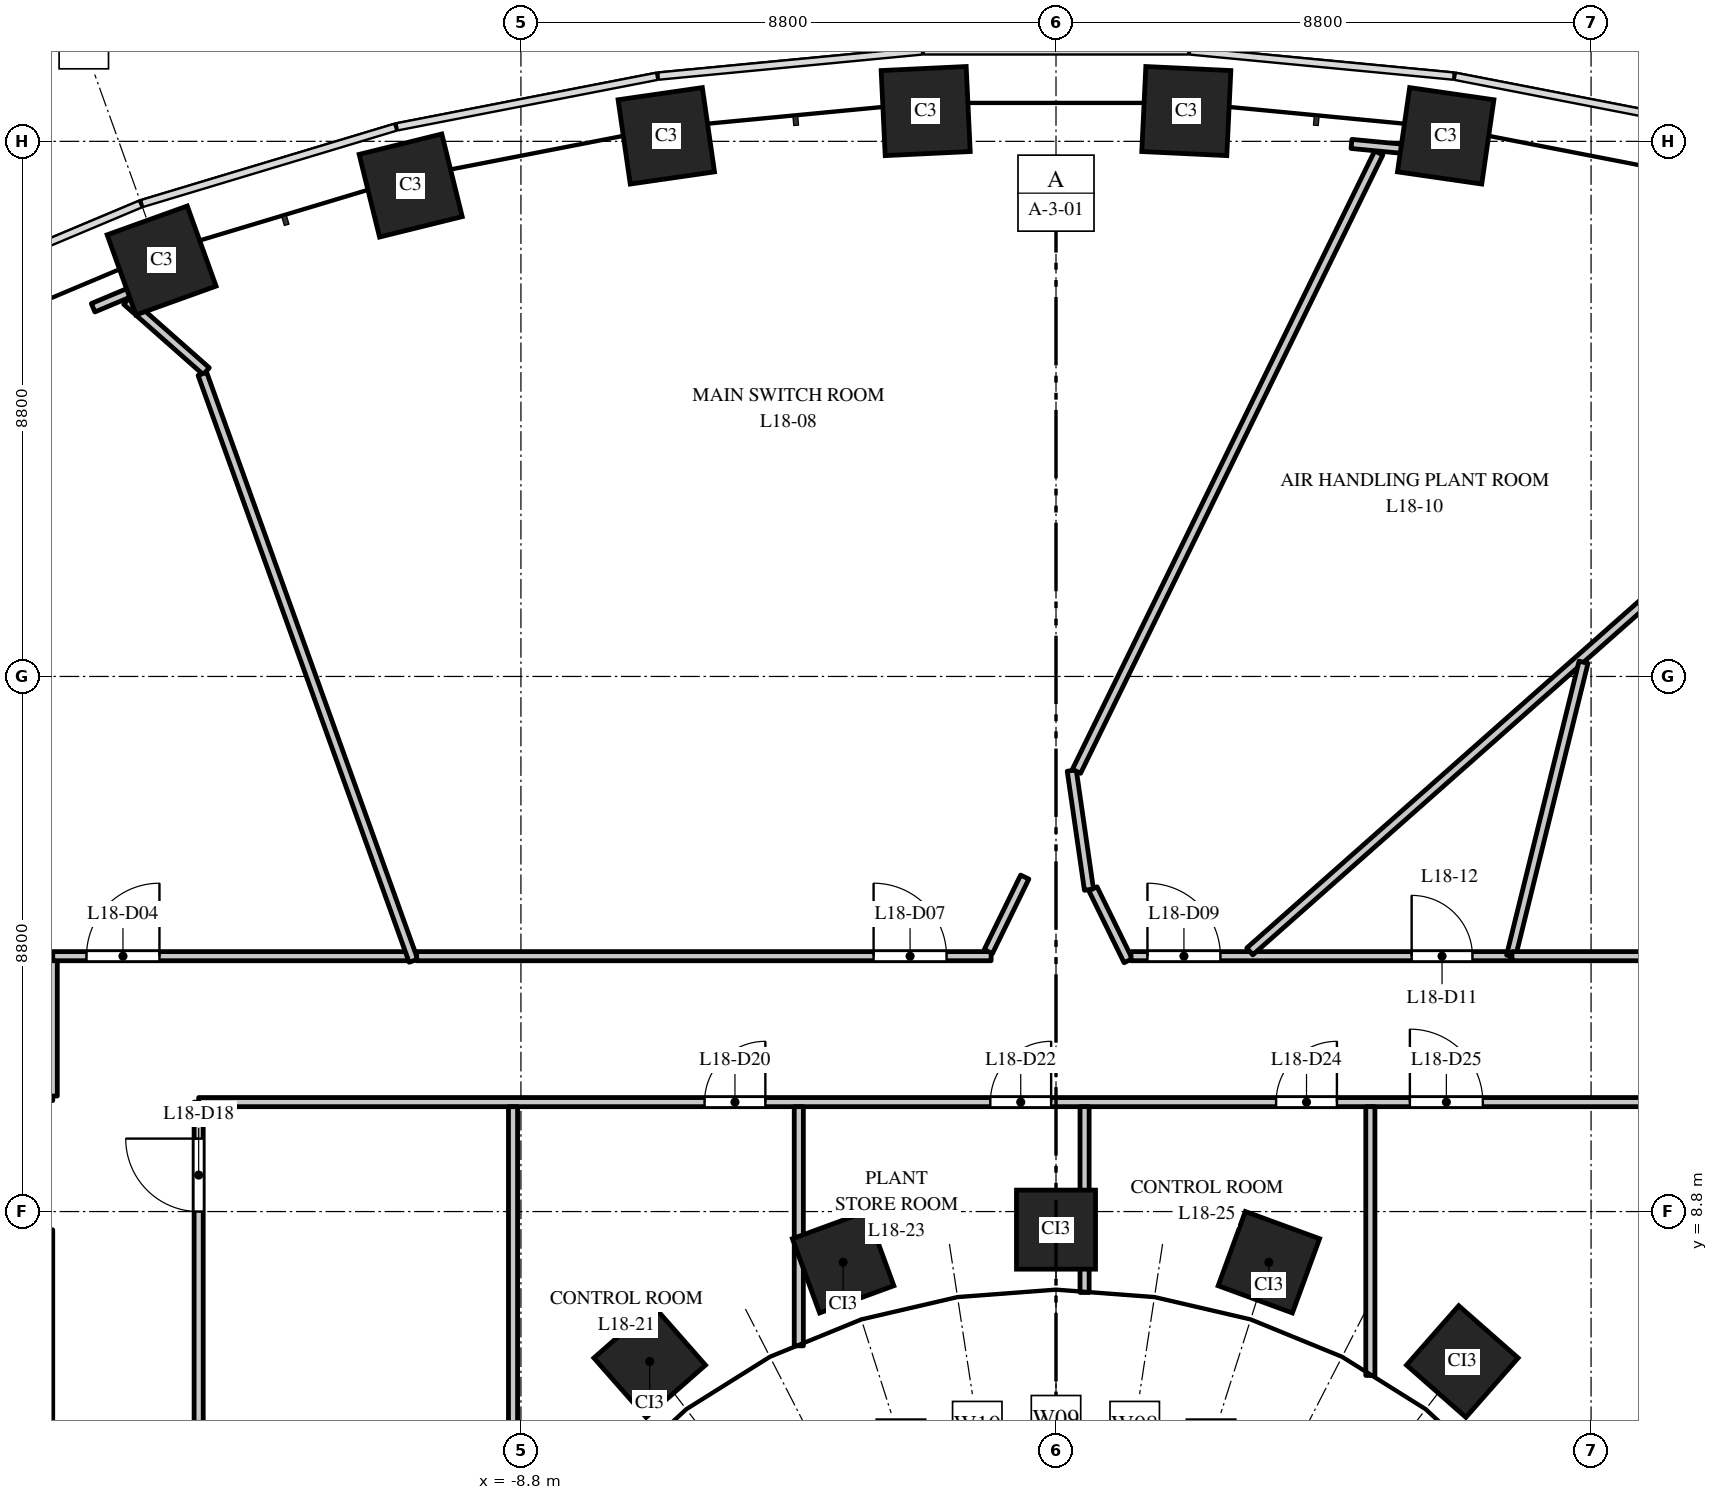
"""IFC4 building model, lengths in metres.
Left out: names, types, materials, properties, quantities, classifications, styles, units other than length and angle.
Written with IfcOpenShell. Run it as: python <this file> out.ifc"""

import sys

from ifc_helpers import new_model, si_unit, direction, frame, frame_2d, origin, origin_2d, place, context, subcontext, project, spatial, rectangle, extrude, element, fill, save


model = new_model("IFC4")
c1 = context("Model", 3, precision=1e-05, world=origin(), true_north=direction((0.0, 1.0)))
c2 = subcontext(c1, "Body", "Model", "MODEL_VIEW")
j1 = project(units=[si_unit("LENGTHUNIT", "METRE"), si_unit("PLANEANGLEUNIT", "RADIAN")], contexts=[c1])
p1 = place(None, origin())
s1 = spatial("IfcSite", under=j1, at=p1, CompositionType="ELEMENT")
p2 = place(p1, origin())
s2 = spatial("IfcBuilding", under=s1, at=p2, CompositionType="ELEMENT")
p3 = place(p2, frame((0.0, 0.0, 82.5)))
s3 = spatial("IfcBuildingStorey", under=s2, at=p3, CompositionType="ELEMENT", Elevation=82.5)
for number, where, z_axis, x_axis in (
    (1, (6.409, 26.491, 0.0), (0.0, 0.0, 1.0), (-0.99, 0.143, 0.0)),
    (2, (2.143, 26.898, 0.0), (0.0, 0.0, 1.0), (-0.999, 0.048, 0.0)),
    (3, (-2.143, 26.898, 0.0), (0.0, 0.0, 1.0), (-0.999, -0.048, 0.0)),
    (4, (-6.409, 26.491, 0.0), (0.0, 0.0, 1.0), (-0.99, -0.143, 0.0)),
    (5, (-10.613, 25.674, 0.0), (0.0, 0.0, 1.0), (-0.971, -0.24, 0.0)),
    (6, (-14.709, 24.441, 0.0), (0.0, 0.0, 1.0), (-0.941, -0.338, 0.0)),
):
    element("IfcColumn", number, at=place(p3, frame(where, z_axis=z_axis, x_axis=x_axis)), inside=s3, PredefinedType="COLUMN", context=c2, shape_type="SweptSolid", body=[
        extrude(rectangle(XDim=1.4, YDim=1.4, at=origin_2d()), origin(), (0.0, 0.0, 1.0), 5.5),
    ])
for number, where, z_axis, x_axis in (
    (7, (6.682, 6.334, 0.0), (0.0, 0.0, 1.0), (-0.751, 0.66, 0.0)),
    (8, (3.501, 7.967, 0.0), (0.0, 0.0, 1.0), (-0.939, 0.344, 0.0)),
    (9, (0.0, 8.503, 0.0), (0.0, 0.0, 1.0), (-1.0, 0.0, 0.0)),
    (10, (-3.501, 7.967, 0.0), (0.0, 0.0, 1.0), (-0.939, -0.344, 0.0)),
    (11, (-6.682, 6.334, 0.0), (0.0, 0.0, 1.0), (-0.751, -0.66, 0.0)),
):
    element("IfcColumn", number, at=place(p3, frame(where, z_axis=z_axis, x_axis=x_axis)), inside=s3, PredefinedType="COLUMN", context=c2, shape_type="SweptSolid", body=[
        extrude(rectangle(XDim=1.3, YDim=1.3, at=origin_2d()), origin(), (0.0, 0.0, 1.0), 5.5),
    ])
p4 = place(p3, frame((-16.5, 8.25, 0.0), z_axis=(0.0, 0.0, 1.0), x_axis=(-1.0, 0.0, 0.0)))
e12 = element("IfcWall", 12, at=p4, inside=s3, PredefinedType="SHEAR", context=c2, shape_type="SweptSolid", body=[
    extrude(rectangle(XDim=15.0, YDim=0.5, at=frame_2d((7.5, 0.0))), origin(), (0.0, 0.0, 1.0), 5.2),
])
p5 = place(p4, frame((6.9, 0.0, 0.0)))
e13 = element("IfcOpeningElement", 13, at=p5, cuts=e12, PredefinedType="OPENING", context=c2, shape_type="SweptSolid", body=[
    extrude(rectangle(XDim=1.2, YDim=2.1, at=frame_2d((0.6, 1.05))), frame((0.0, 0.26, 0.0), z_axis=(0.0, -1.0, 0.0), x_axis=(1.0, 0.0, 0.0)), (0.0, 0.0, 1.0), 0.52),
])
p6 = place(p4, frame((12.57, 0.0, 0.0)))
e14 = element("IfcOpeningElement", 14, at=p6, cuts=e12, PredefinedType="OPENING", context=c2, shape_type="SweptSolid", body=[
    extrude(rectangle(XDim=0.9, YDim=2.1, at=frame_2d((0.45, 1.05))), frame((0.0, 0.26, 0.0), z_axis=(0.0, -1.0, 0.0), x_axis=(1.0, 0.0, 0.0)), (0.0, 0.0, 1.0), 0.52),
])
p7 = place(p3, frame((-16.7, -8.0, 0.0), z_axis=(0.0, 0.0, 1.0), x_axis=(0.0, 1.0, 0.0)))
e15 = element("IfcWall", 15, at=p7, inside=s3, PredefinedType="SHEAR", context=c2, shape_type="SweptSolid", body=[
    extrude(rectangle(XDim=16.0, YDim=0.4, at=frame_2d((8.0, 0.0))), origin(), (0.0, 0.0, 1.0), 5.2),
])
p8 = place(p3, frame((-30.395, 10.7, 0.0), z_axis=(0.0, 0.0, 1.0), x_axis=(1.0, 0.0, 0.0)))
e16 = element("IfcWall", 16, at=p8, inside=s3, PredefinedType="PARTITIONING", context=c2, shape_type="SweptSolid", body=[
    extrude(rectangle(XDim=13.895, YDim=0.15, at=frame_2d((6.948, 0.0))), origin(), (0.0, 0.0, 1.0), 4.4),
])
p9 = place(p8, frame((5.77, 0.0, 0.0)))
e17 = element("IfcOpeningElement", 17, at=p9, cuts=e16, PredefinedType="OPENING", context=c2, shape_type="SweptSolid", body=[
    extrude(rectangle(XDim=1.0, YDim=2.1, at=frame_2d((0.5, 1.05))), frame((0.0, 0.085, 0.0), z_axis=(0.0, -1.0, 0.0), x_axis=(1.0, 0.0, 0.0)), (0.0, 0.0, 1.0), 0.17),
])
p10 = place(p3, frame((-16.5, 10.7, 0.0), z_axis=(0.0, 0.0, 1.0), x_axis=(0.0, 1.0, 0.0)))
e18 = element("IfcWall", 18, at=p10, inside=s3, PredefinedType="PARTITIONING", context=c2, shape_type="SweptSolid", body=[
    extrude(rectangle(XDim=2.3, YDim=0.15, at=frame_2d((1.15, 0.0))), origin(), (0.0, 0.0, 1.0), 4.25),
])
p11 = place(p3, frame((-16.5, 13.0, 0.0), z_axis=(0.0, 0.0, 1.0), x_axis=(1.0, 0.0, 0.0)))
e19 = element("IfcWall", 19, at=p11, inside=s3, PredefinedType="PARTITIONING", context=c2, shape_type="SweptSolid", body=[
    extrude(rectangle(XDim=5.893, YDim=0.15, at=frame_2d((2.947, 0.0))), origin(), (0.0, 0.0, 1.0), 4.35),
])
p12 = place(p11, frame((0.555, 0.0, 0.0)))
e20 = element("IfcOpeningElement", 20, at=p12, cuts=e19, PredefinedType="OPENING", context=c2, shape_type="SweptSolid", body=[
    extrude(rectangle(XDim=1.2, YDim=2.1, at=frame_2d((0.6, 1.05))), frame((0.0, 0.085, 0.0), z_axis=(0.0, -1.0, 0.0), x_axis=(1.0, 0.0, 0.0)), (0.0, 0.0, 1.0), 0.17),
])
p13 = place(p3, frame((-15.283, 23.776, 0.0), z_axis=(0.0, 0.0, 1.0), x_axis=(0.749266135691, -0.662269022307, 0.0)))
e21 = element("IfcWall", 21, at=p13, inside=s3, PredefinedType="PARTITIONING", context=c2, shape_type="SweptSolid", body=[
    extrude(rectangle(XDim=1.746, YDim=0.15, at=frame_2d((0.873, 0.0))), origin(), (0.0, 0.0, 1.0), 4.4),
])
p14 = place(p3, frame((-14.1, -10.6, 0.0), z_axis=(0.0, 0.0, 1.0), x_axis=(0.0, 1.0, 0.0)))
e22 = element("IfcWall", 22, at=p14, inside=s3, PredefinedType="PARTITIONING", context=c2, shape_type="SweptSolid", body=[
    extrude(rectangle(XDim=21.2, YDim=0.15, at=frame_2d((10.6, 0.0))), origin(), (0.0, 0.0, 1.0), 4.25),
])
p15 = place(p14, frame((19.4, 0.0, 0.0)))
e23 = element("IfcOpeningElement", 23, at=p15, cuts=e22, PredefinedType="OPENING", context=c2, shape_type="SweptSolid", body=[
    extrude(rectangle(XDim=1.2, YDim=2.1, at=frame_2d((0.6, 1.05))), frame((0.0, 0.085, 0.0), z_axis=(0.0, -1.0, 0.0), x_axis=(1.0, 0.0, 0.0)), (0.0, 0.0, 1.0), 0.17),
])
p16 = place(p3, frame((-14.1, 10.6, 0.0), z_axis=(0.0, 0.0, 1.0), x_axis=(1.0, 0.0, 0.0)))
e24 = element("IfcWall", 24, at=p16, inside=s3, PredefinedType="PARTITIONING", context=c2, shape_type="SweptSolid", body=[
    extrude(rectangle(XDim=28.2, YDim=0.15, at=frame_2d((14.1, 0.0))), origin(), (0.0, 0.0, 1.0), 4.35),
])
p17 = place(p16, frame((8.32, 0.0, 0.0)))
e25 = element("IfcOpeningElement", 25, at=p17, cuts=e24, PredefinedType="OPENING", context=c2, shape_type="SweptSolid", body=[
    extrude(rectangle(XDim=1.0, YDim=2.1, at=frame_2d((0.5, 1.05))), frame((0.0, 0.085, 0.0), z_axis=(0.0, -1.0, 0.0), x_axis=(1.0, 0.0, 0.0)), (0.0, 0.0, 1.0), 0.17),
])
p18 = place(p16, frame((13.02, 0.0, 0.0)))
e26 = element("IfcOpeningElement", 26, at=p18, cuts=e24, PredefinedType="OPENING", context=c2, shape_type="SweptSolid", body=[
    extrude(rectangle(XDim=1.0, YDim=2.1, at=frame_2d((0.5, 1.05))), frame((0.0, 0.085, 0.0), z_axis=(0.0, -1.0, 0.0), x_axis=(1.0, 0.0, 0.0)), (0.0, 0.0, 1.0), 0.17),
])
p19 = place(p16, frame((17.72, 0.0, 0.0)))
e27 = element("IfcOpeningElement", 27, at=p19, cuts=e24, PredefinedType="OPENING", context=c2, shape_type="SweptSolid", body=[
    extrude(rectangle(XDim=1.0, YDim=2.1, at=frame_2d((0.5, 1.05))), frame((0.0, 0.085, 0.0), z_axis=(0.0, -1.0, 0.0), x_axis=(1.0, 0.0, 0.0)), (0.0, 0.0, 1.0), 0.17),
])
p20 = place(p16, frame((19.92, 0.0, 0.0)))
e28 = element("IfcOpeningElement", 28, at=p20, cuts=e24, PredefinedType="OPENING", context=c2, shape_type="SweptSolid", body=[
    extrude(rectangle(XDim=1.2, YDim=2.1, at=frame_2d((0.6, 1.05))), frame((0.0, 0.085, 0.0), z_axis=(0.0, -1.0, 0.0), x_axis=(1.0, 0.0, 0.0)), (0.0, 0.0, 1.0), 0.17),
])
p21 = place(p3, frame((-14.039, 22.576, 0.0), z_axis=(0.0, 0.0, 1.0), x_axis=(0.338428639274, -0.940992059541, 0.0)))
e29 = element("IfcWall", 29, at=p21, inside=s3, PredefinedType="PARTITIONING", context=c2, shape_type="SweptSolid", body=[
    extrude(rectangle(XDim=10.256, YDim=0.15, at=frame_2d((5.128, 0.0))), origin(), (0.0, 0.0, 1.0), 4.35),
])
p22 = place(p3, frame((-10.515, 13.0, 0.0), z_axis=(0.0, 0.0, 1.0), x_axis=(1.0, 0.0, 0.0)))
e30 = element("IfcWall", 30, at=p22, inside=s3, PredefinedType="PARTITIONING", context=c2, shape_type="SweptSolid", body=[
    extrude(rectangle(XDim=9.448, YDim=0.15, at=frame_2d((4.724, 0.0))), origin(), (0.0, 0.0, 1.0), 4.35),
])
p23 = place(p22, frame((7.515, 0.0, 0.0)))
e31 = element("IfcOpeningElement", 31, at=p23, cuts=e30, PredefinedType="OPENING", context=c2, shape_type="SweptSolid", body=[
    extrude(rectangle(XDim=1.2, YDim=2.1, at=frame_2d((0.6, 1.05))), frame((0.0, 0.085, 0.0), z_axis=(0.0, -1.0, 0.0), x_axis=(1.0, 0.0, 0.0)), (0.0, 0.0, 1.0), 0.17),
])
p24 = place(p3, frame((-8.93, 0.518, 0.0), z_axis=(0.0, 0.0, 1.0), x_axis=(0.0, 1.0, 0.0)))
e32 = element("IfcWall", 32, at=p24, inside=s3, PredefinedType="PARTITIONING", context=c2, shape_type="SweptSolid", body=[
    extrude(rectangle(XDim=10.007, YDim=0.15, at=frame_2d((5.003, 0.0))), origin(), (0.0, 0.0, 1.0), 4.25),
])
p25 = place(p3, frame((-4.23, 6.592, 0.0), z_axis=(0.0, 0.0, 1.0), x_axis=(0.0, 1.0, 0.0)))
e33 = element("IfcWall", 33, at=p25, inside=s3, PredefinedType="PARTITIONING", context=c2, shape_type="SweptSolid", body=[
    extrude(rectangle(XDim=3.933, YDim=0.15, at=frame_2d((1.966, 0.0))), origin(), (0.0, 0.0, 1.0), 4.35),
])
p26 = place(p3, frame((-1.113, 13.075, 0.0), z_axis=(0.0, 0.0, 1.0), x_axis=(0.439036850384, 0.898469055675, 0.0)))
e34 = element("IfcWall", 34, at=p26, inside=s3, PredefinedType="PARTITIONING", context=c2, shape_type="SweptSolid", body=[
    extrude(rectangle(XDim=1.365, YDim=0.15, at=frame_2d((0.682, 0.0))), origin(), (0.0, 0.0, 1.0), 4.35),
])
p27 = place(p3, frame((0.259, 16.052, 0.0), z_axis=(0.0, 0.0, 1.0), x_axis=(0.143027920195, -0.989718653984, 0.0)))
e35 = element("IfcWall", 35, at=p27, inside=s3, PredefinedType="PARTITIONING", context=c2, shape_type="SweptSolid", body=[
    extrude(rectangle(XDim=1.978, YDim=0.15, at=frame_2d((0.989, 0.0))), origin(), (0.0, 0.0, 1.0), 5.2),
])
p28 = place(p3, frame((0.337, 16.04, 0.0), z_axis=(0.0, 0.0, 1.0), x_axis=(0.439198527349, 0.898390034214, 0.0)))
e36 = element("IfcWall", 36, at=p28, inside=s3, PredefinedType="PARTITIONING", context=c2, shape_type="SweptSolid", body=[
    extrude(rectangle(XDim=11.32, YDim=0.15, at=frame_2d((5.66, 0.0))), origin(), (0.0, 0.0, 1.0), 4.4),
])
p29 = place(p3, frame((0.47, 7.469, 0.0), z_axis=(0.0, 0.0, 1.0), x_axis=(0.0, 1.0, 0.0)))
e37 = element("IfcWall", 37, at=p29, inside=s3, PredefinedType="PARTITIONING", context=c2, shape_type="SweptSolid", body=[
    extrude(rectangle(XDim=3.056, YDim=0.15, at=frame_2d((1.528, 0.0))), origin(), (0.0, 0.0, 1.0), 4.4),
])
p30 = place(p3, frame((0.608, 14.108, 0.0), z_axis=(0.0, 0.0, 1.0), x_axis=(0.439708780633, -0.898140405635, 0.0)))
e38 = element("IfcWall", 38, at=p30, inside=s3, PredefinedType="PARTITIONING", context=c2, shape_type="SweptSolid", body=[
    extrude(rectangle(XDim=1.317, YDim=0.15, at=frame_2d((0.658, 0.0))), origin(), (0.0, 0.0, 1.0), 5.2),
])
p31 = place(p3, frame((1.233, 13.0, 0.0), z_axis=(0.0, 0.0, 1.0), x_axis=(1.0, 0.0, 0.0)))
e39 = element("IfcWall", 39, at=p31, inside=s3, PredefinedType="PARTITIONING", context=c2, shape_type="SweptSolid", body=[
    extrude(rectangle(XDim=6.25, YDim=0.15, at=frame_2d((3.125, 0.0))), origin(), (0.0, 0.0, 1.0), 4.35),
])
p32 = place(p31, frame((0.271, 0.0, 0.0)))
e40 = element("IfcOpeningElement", 40, at=p32, cuts=e39, PredefinedType="OPENING", context=c2, shape_type="SweptSolid", body=[
    extrude(rectangle(XDim=1.2, YDim=2.1, at=frame_2d((0.6, 1.05))), frame((0.0, 0.085, 0.0), z_axis=(0.0, -1.0, 0.0), x_axis=(1.0, 0.0, 0.0)), (0.0, 0.0, 1.0), 0.17),
])
p33 = place(p31, frame((4.616, 0.0, 0.0)))
e41 = element("IfcOpeningElement", 41, at=p33, cuts=e39, PredefinedType="OPENING", context=c2, shape_type="SweptSolid", body=[
    extrude(rectangle(XDim=1.0, YDim=2.1, at=frame_2d((0.5, 1.05))), frame((0.0, 0.085, 0.0), z_axis=(0.0, -1.0, 0.0), x_axis=(1.0, 0.0, 0.0)), (0.0, 0.0, 1.0), 0.17),
])
p34 = place(p3, frame((3.187, 13.078, 0.0), z_axis=(0.0, 0.0, 1.0), x_axis=(0.749072740897, 0.662487757506, 0.0)))
e42 = element("IfcWall", 42, at=p34, inside=s3, PredefinedType="PARTITIONING", context=c2, shape_type="SweptSolid", body=[
    extrude(rectangle(XDim=16.148, YDim=0.15, at=frame_2d((8.074, 0.0))), origin(), (0.0, 0.0, 1.0), 4.35),
])
p35 = place(p3, frame((5.17, 6.105, 0.0), z_axis=(0.0, 0.0, 1.0), x_axis=(0.0, 1.0, 0.0)))
e43 = element("IfcWall", 43, at=p35, inside=s3, PredefinedType="PARTITIONING", context=c2, shape_type="SweptSolid", body=[
    extrude(rectangle(XDim=4.42, YDim=0.15, at=frame_2d((2.21, 0.0))), origin(), (0.0, 0.0, 1.0), 4.35),
])
p36 = place(p3, frame((7.483, 13.0, 0.0), z_axis=(0.0, 0.0, 1.0), x_axis=(0.239672770915, 0.970853728881, 0.0)))
e44 = element("IfcWall", 44, at=p36, inside=s3, PredefinedType="PARTITIONING", context=c2, shape_type="SweptSolid", body=[
    extrude(rectangle(XDim=4.978, YDim=0.15, at=frame_2d((2.489, 0.0))), origin(), (0.0, 0.0, 1.0), 5.2),
])
p37 = place(p3, frame((7.499, 13.0, 0.0), z_axis=(0.0, 0.0, 1.0), x_axis=(1.0, 0.0, 0.0)))
e45 = element("IfcWall", 45, at=p37, inside=s3, PredefinedType="PARTITIONING", context=c2, shape_type="SweptSolid", body=[
    extrude(rectangle(XDim=9.001, YDim=0.15, at=frame_2d((4.5, 0.0))), origin(), (0.0, 0.0, 1.0), 4.35),
])
p38 = place(p37, frame((7.151, 0.0, 0.0)))
e46 = element("IfcOpeningElement", 46, at=p38, cuts=e45, PredefinedType="OPENING", context=c2, shape_type="SweptSolid", body=[
    extrude(rectangle(XDim=1.2, YDim=2.1, at=frame_2d((0.6, 1.05))), frame((0.0, 0.085, 0.0), z_axis=(0.0, -1.0, 0.0), x_axis=(1.0, 0.0, 0.0)), (0.0, 0.0, 1.0), 0.17),
])
p39 = place(p3, frame((-15.229, 23.919, 0.0), z_axis=(0.0, 0.0, 1.0), x_axis=(-0.921921214846, -0.387377430444, 0.0)))
e47 = element("IfcWall", 47, at=p39, inside=s3, PredefinedType="PARTITIONING", context=c2, shape_type="SweptSolid", body=[
    extrude(rectangle(XDim=0.659, YDim=0.15, at=frame_2d((0.329, 0.0))), origin(), (0.0, 0.0, 1.0), 5.2),
])
p40 = place(p3, frame((5.705, 26.277, 0.0), z_axis=(0.0, 0.0, 1.0), x_axis=(-0.995485124943, 0.094917680217, 0.0)))
e48 = element("IfcWall", 48, at=p40, inside=s3, PredefinedType="PARTITIONING", context=c2, shape_type="SweptSolid", body=[
    extrude(rectangle(XDim=0.849, YDim=0.15, at=frame_2d((0.424, 0.0))), origin(), (0.0, 0.0, 1.0), 5.2),
])
p41 = place(p12, origin())
e49 = element("IfcDoor", 49, at=p41, inside=s3, OperationType="SINGLE_SWING_RIGHT", PredefinedType="DOOR", context=c2, shape_type="SweptSolid", body=[
    extrude(rectangle(XDim=1.2, YDim=2.1, at=frame_2d((0.6, 1.05))), frame((0.0, 0.025, 0.0), z_axis=(0.0, -1.0, 0.0), x_axis=(1.0, 0.0, 0.0)), (0.0, 0.0, 1.0), 0.05),
])
fill(e20, e49)
p42 = place(p23, origin())
e50 = element("IfcDoor", 50, at=p42, inside=s3, OperationType="SINGLE_SWING_LEFT", PredefinedType="DOOR", context=c2, shape_type="SweptSolid", body=[
    extrude(rectangle(XDim=1.2, YDim=2.1, at=frame_2d((0.6, 1.05))), frame((0.0, 0.025, 0.0), z_axis=(0.0, -1.0, 0.0), x_axis=(1.0, 0.0, 0.0)), (0.0, 0.0, 1.0), 0.05),
])
fill(e31, e50)
p43 = place(p32, origin())
e51 = element("IfcDoor", 51, at=p43, inside=s3, OperationType="SINGLE_SWING_LEFT", PredefinedType="DOOR", context=c2, shape_type="SweptSolid", body=[
    extrude(rectangle(XDim=1.2, YDim=2.1, at=frame_2d((0.6, 1.05))), frame((0.0, 0.025, 0.0), z_axis=(0.0, -1.0, 0.0), x_axis=(1.0, 0.0, 0.0)), (0.0, 0.0, 1.0), 0.05),
])
fill(e40, e51)
p44 = place(p33, origin())
e52 = element("IfcDoor", 52, at=p44, inside=s3, OperationType="SINGLE_SWING_LEFT", PredefinedType="DOOR", context=c2, shape_type="SweptSolid", body=[
    extrude(rectangle(XDim=1.0, YDim=2.1, at=frame_2d((0.5, 1.05))), frame((0.0, 0.025, 0.0), z_axis=(0.0, -1.0, 0.0), x_axis=(1.0, 0.0, 0.0)), (0.0, 0.0, 1.0), 0.05),
])
fill(e41, e52)
p45 = place(p15, origin())
e53 = element("IfcDoor", 53, at=p45, inside=s3, OperationType="SINGLE_SWING_RIGHT", PredefinedType="DOOR", context=c2, shape_type="SweptSolid", body=[
    extrude(rectangle(XDim=1.2, YDim=2.1, at=frame_2d((0.6, 1.05))), frame((0.0, 0.025, 0.0), z_axis=(0.0, -1.0, 0.0), x_axis=(1.0, 0.0, 0.0)), (0.0, 0.0, 1.0), 0.05),
])
fill(e23, e53)
p46 = place(p17, origin())
e54 = element("IfcDoor", 54, at=p46, inside=s3, OperationType="SINGLE_SWING_RIGHT", PredefinedType="DOOR", context=c2, shape_type="SweptSolid", body=[
    extrude(rectangle(XDim=1.0, YDim=2.1, at=frame_2d((0.5, 1.05))), frame((0.0, 0.025, 0.0), z_axis=(0.0, -1.0, 0.0), x_axis=(1.0, 0.0, 0.0)), (0.0, 0.0, 1.0), 0.05),
])
fill(e25, e54)
p47 = place(p18, origin())
e55 = element("IfcDoor", 55, at=p47, inside=s3, OperationType="SINGLE_SWING_RIGHT", PredefinedType="DOOR", context=c2, shape_type="SweptSolid", body=[
    extrude(rectangle(XDim=1.0, YDim=2.1, at=frame_2d((0.5, 1.05))), frame((0.0, 0.025, 0.0), z_axis=(0.0, -1.0, 0.0), x_axis=(1.0, 0.0, 0.0)), (0.0, 0.0, 1.0), 0.05),
])
fill(e26, e55)
p48 = place(p19, origin())
e56 = element("IfcDoor", 56, at=p48, inside=s3, OperationType="SINGLE_SWING_RIGHT", PredefinedType="DOOR", context=c2, shape_type="SweptSolid", body=[
    extrude(rectangle(XDim=1.0, YDim=2.1, at=frame_2d((0.5, 1.05))), frame((0.0, 0.025, 0.0), z_axis=(0.0, -1.0, 0.0), x_axis=(1.0, 0.0, 0.0)), (0.0, 0.0, 1.0), 0.05),
])
fill(e27, e56)
p49 = place(p20, origin())
e57 = element("IfcDoor", 57, at=p49, inside=s3, OperationType="SINGLE_SWING_LEFT", PredefinedType="DOOR", context=c2, shape_type="SweptSolid", body=[
    extrude(rectangle(XDim=1.2, YDim=2.1, at=frame_2d((0.6, 1.05))), frame((0.0, 0.025, 0.0), z_axis=(0.0, -1.0, 0.0), x_axis=(1.0, 0.0, 0.0)), (0.0, 0.0, 1.0), 0.05),
])
fill(e28, e57)
save(model, sys.argv[1])
